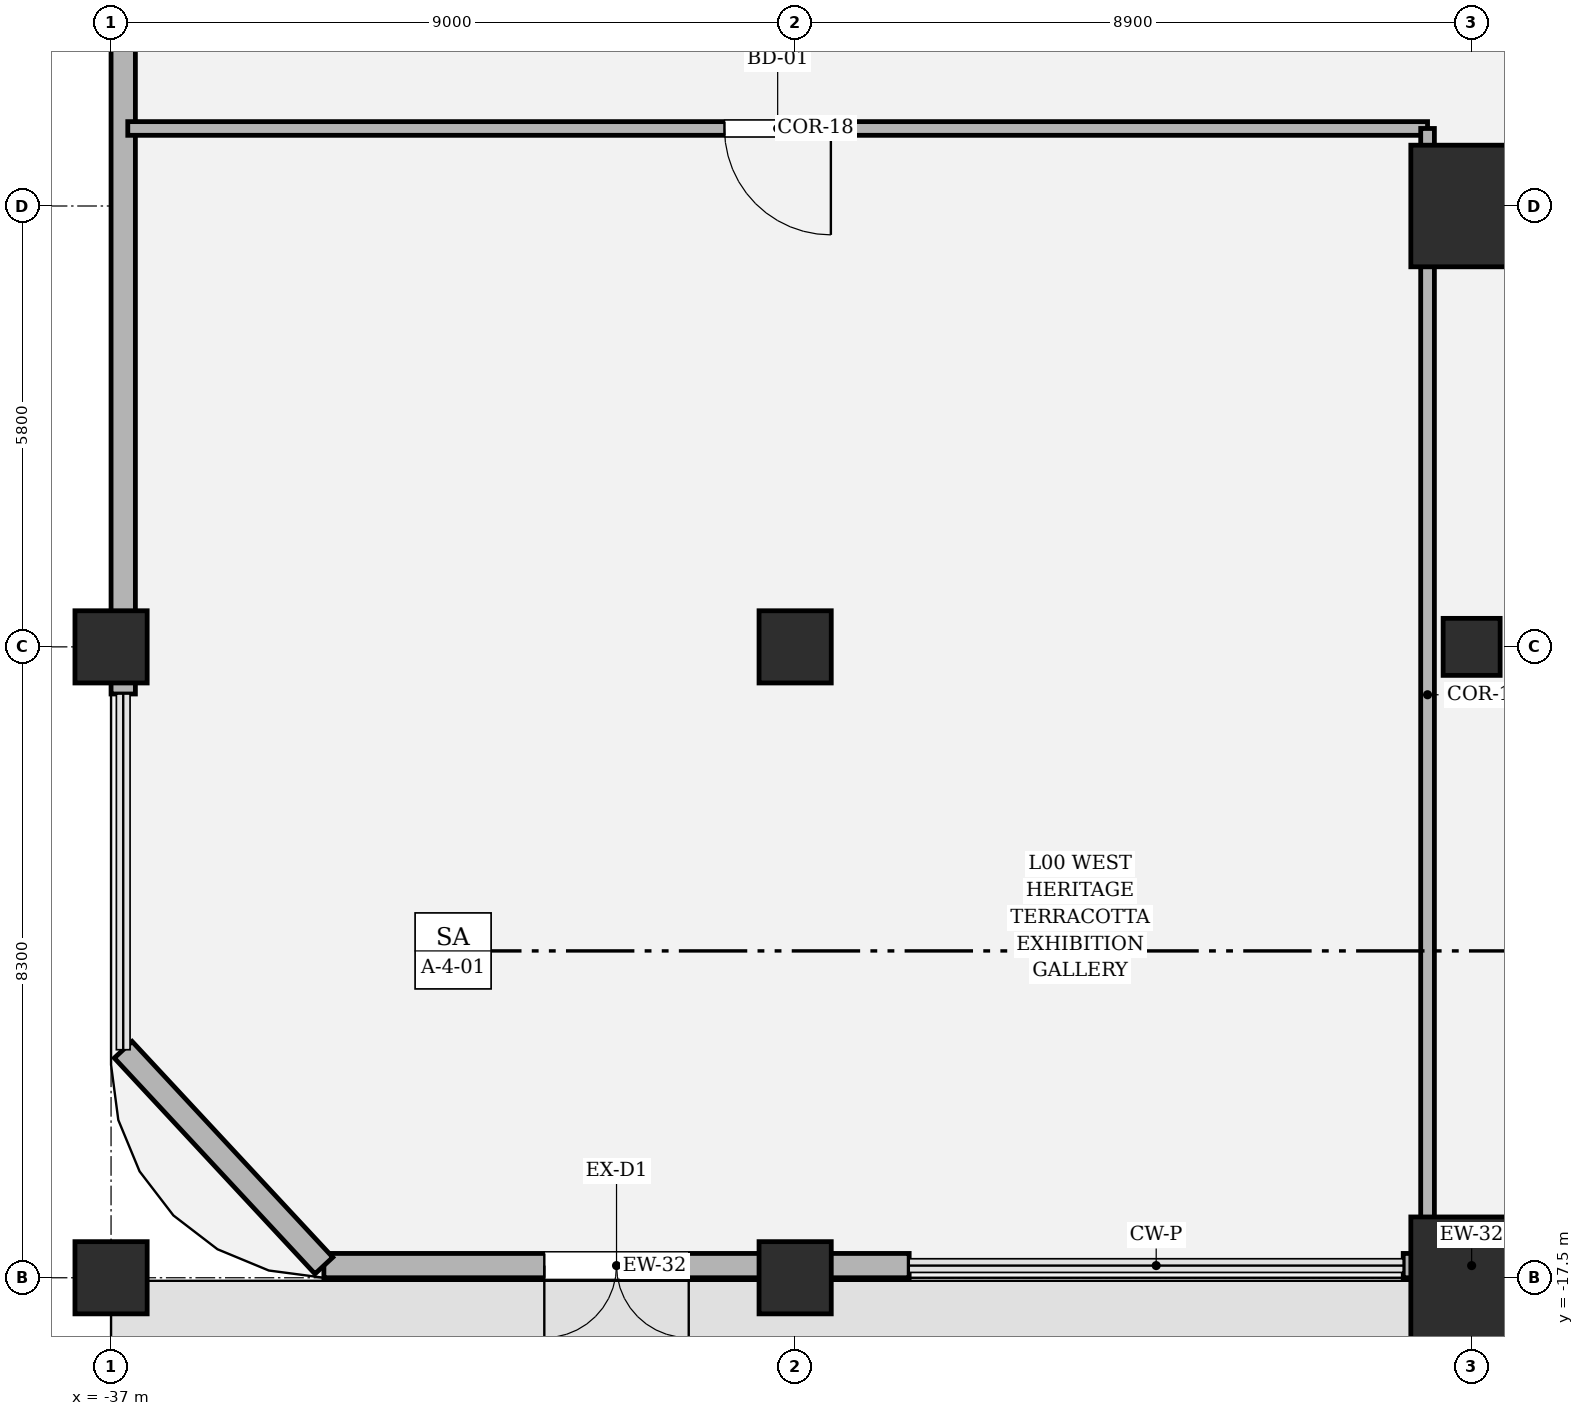
"""IFC4 building model, lengths in metres.
Left out: names, types, materials, properties, quantities, classifications, styles, units other than length and angle.
Written with IfcOpenShell. Run it as: python <this file> out.ifc"""

import sys

from ifc_helpers import new_model, si_unit, direction, frame, frame_2d, origin, origin_2d, place, context, subcontext, project, spatial, rectangle, hollow_rectangle, circle, extrude, element, fill, save


model = new_model("IFC4")
c1 = context("Model", 3, precision=1e-05, world=origin(), true_north=direction((0.0, 1.0)))
c2 = subcontext(c1, "Body", "Model", "MODEL_VIEW")
j1 = project(units=[si_unit("LENGTHUNIT", "METRE"), si_unit("PLANEANGLEUNIT", "RADIAN")], contexts=[c1])
p1 = place(None, origin())
s1 = spatial("IfcSite", under=j1, at=p1, CompositionType="ELEMENT")
p2 = place(p1, origin())
s2 = spatial("IfcBuilding", under=s1, at=p2, CompositionType="ELEMENT")
p3 = place(p2, origin())
s3 = spatial("IfcBuildingStorey", under=s2, at=p3, CompositionType="ELEMENT", Elevation=0.0)
for number, where, z_axis, x_axis in (
    (1, (-19.1, -17.5, 0.0), (0.0, 0.0, 1.0), (1.0, 0.0, 0.0)),
    (2, (-19.1, -3.4, 0.0), (0.0, 0.0, 1.0), (1.0, 0.0, 0.0)),
):
    element("IfcColumn", number, at=place(p3, frame(where, z_axis=z_axis, x_axis=x_axis)), inside=s3, PredefinedType="COLUMN", context=c2, shape_type="SweptSolid", body=[
        extrude(hollow_rectangle(XDim=1.6, YDim=1.6, WallThickness=0.05, at=origin_2d()), origin(), (0.0, 0.0, 1.0), 6.0),
    ])
for number, where, z_axis, x_axis in (
    (3, (-37.0, -17.5, 0.0), (0.0, 0.0, 1.0), (1.0, 0.0, 0.0)),
    (4, (-28.0, -17.5, 0.0), (0.0, 0.0, 1.0), (1.0, 0.0, 0.0)),
    (5, (-37.0, -9.2, 0.0), (0.0, 0.0, 1.0), (1.0, 0.0, 0.0)),
    (6, (-28.0, -9.2, 0.0), (0.0, 0.0, 1.0), (1.0, 0.0, 0.0)),
):
    element("IfcColumn", number, at=place(p3, frame(where, z_axis=z_axis, x_axis=x_axis)), inside=s3, PredefinedType="COLUMN", context=c2, shape_type="SweptSolid", body=[
        extrude(rectangle(XDim=0.95, YDim=0.95, at=origin_2d()), origin(), (0.0, 0.0, 1.0), 6.0),
    ])
p4 = place(p3, frame((-19.1, -9.2, 0.0), z_axis=(0.0, 0.0, 1.0), x_axis=(1.0, 0.0, 0.0)))
e7 = element("IfcColumn", 7, at=p4, inside=s3, PredefinedType="PILASTER", context=c2, shape_type="SweptSolid", body=[
    extrude(circle(Radius=0.375, at=origin_2d()), origin(), (0.0, 0.0, 1.0), 6.0),
])
p5 = place(p3, frame((-26.5, -17.34, 0.0), z_axis=(0.0, 0.0, 1.0), x_axis=(-1.0, 0.0, 0.0)))
e8 = element("IfcWall", 8, at=p5, inside=s3, PredefinedType="SOLIDWALL", context=c2, shape_type="SweptSolid", body=[
    extrude(rectangle(XDim=7.7, YDim=0.32, at=frame_2d((3.85, 0.0))), origin(), (0.0, 0.0, 1.0), 5.014),
])
p6 = place(p5, frame((2.9, 0.0, 0.0)))
e9 = element("IfcOpeningElement", 9, at=p6, cuts=e8, PredefinedType="OPENING", context=c2, shape_type="SweptSolid", body=[
    extrude(rectangle(XDim=1.9, YDim=2.4, at=frame_2d((0.95, 1.2))), frame((0.0, 0.17, 0.0), z_axis=(0.0, -1.0, 0.0), x_axis=(1.0, 0.0, 0.0)), (0.0, 0.0, 1.0), 0.34),
])
p7 = place(p3, frame((-18.2, -17.34, 0.0), z_axis=(0.0, 0.0, 1.0), x_axis=(-1.0, 0.0, 0.0)))
e10 = element("IfcWall", 10, at=p7, inside=s3, PredefinedType="SOLIDWALL", context=c2, shape_type="SweptSolid", body=[
    extrude(rectangle(XDim=1.8, YDim=0.32, at=frame_2d((0.9, 0.0))), origin(), (0.0, 0.0, 1.0), 5.014),
])
p8 = place(p3, frame((-36.84, -9.82, 0.0), z_axis=(0.0, 0.0, 1.0), x_axis=(0.0, 1.0, 0.0)))
e11 = element("IfcWall", 11, at=p8, inside=s3, PredefinedType="SOLIDWALL", context=c2, shape_type="SweptSolid", body=[
    extrude(rectangle(XDim=19.64, YDim=0.32, at=frame_2d((9.82, 0.0))), origin(), (0.0, 0.0, 1.0), 5.014),
])
p9 = place(p3, frame((-34.2, -17.34, 0.0), z_axis=(0.0, 0.0, 1.0), x_axis=(-0.680854288177, 0.732418895354, 0.0)))
e12 = element("IfcWall", 12, at=p9, inside=s3, PredefinedType="SOLIDWALL", context=c2, shape_type="SweptSolid", body=[
    extrude(rectangle(XDim=3.878, YDim=0.32, at=frame_2d((1.939, 0.0))), origin(), (0.0, 0.0, 1.0), 5.014),
])
p10 = place(p3, frame((-36.78, -2.38, 0.0), z_axis=(0.0, 0.0, 1.0), x_axis=(1.0, 0.0, 0.0)))
e13 = element("IfcWall", 13, at=p10, inside=s3, PredefinedType="PARTITIONING", context=c2, shape_type="SweptSolid", body=[
    extrude(rectangle(XDim=17.1, YDim=0.18, at=frame_2d((8.55, 0.0))), origin(), (0.0, 0.0, 1.0), 5.014),
])
p11 = place(p10, frame((7.85, 0.0, 0.0)))
e14 = element("IfcOpeningElement", 14, at=p11, cuts=e13, PredefinedType="OPENING", context=c2, shape_type="SweptSolid", body=[
    extrude(rectangle(XDim=1.4, YDim=2.25, at=frame_2d((0.7, 1.125))), frame((0.0, 0.1, 0.0), z_axis=(0.0, -1.0, 0.0), x_axis=(1.0, 0.0, 0.0)), (0.0, 0.0, 1.0), 0.2),
])
p12 = place(p3, frame((-19.68, -2.38, 0.0), z_axis=(0.0, 0.0, 1.0), x_axis=(0.0, -1.0, 0.0)))
e15 = element("IfcWall", 15, at=p12, inside=s3, PredefinedType="PARTITIONING", context=c2, shape_type="SweptSolid", body=[
    extrude(rectangle(XDim=14.9, YDim=0.18, at=frame_2d((7.45, 0.0))), origin(), (0.0, 0.0, 1.0), 5.014),
])
p13 = place(p6, origin())
e16 = element("IfcDoor", 16, at=p13, inside=s3, OperationType="DOUBLE_DOOR_SINGLE_SWING", PredefinedType="DOOR", context=c2, shape_type="SweptSolid", body=[
    extrude(rectangle(XDim=1.9, YDim=2.4, at=frame_2d((0.95, 1.2))), frame((0.0, 0.025, 0.0), z_axis=(0.0, -1.0, 0.0), x_axis=(1.0, 0.0, 0.0)), (0.0, 0.0, 1.0), 0.05),
])
fill(e9, e16)
p14 = place(p11, origin())
e17 = element("IfcDoor", 17, at=p14, inside=s3, OperationType="SINGLE_SWING_RIGHT", PredefinedType="DOOR", context=c2, shape_type="SweptSolid", body=[
    extrude(rectangle(XDim=1.4, YDim=2.25, at=frame_2d((0.7, 1.125))), frame((0.0, 0.025, 0.0), z_axis=(0.0, -1.0, 0.0), x_axis=(1.0, 0.0, 0.0)), (0.0, 0.0, 1.0), 0.05),
])
fill(e14, e17)
save(model, sys.argv[1])
